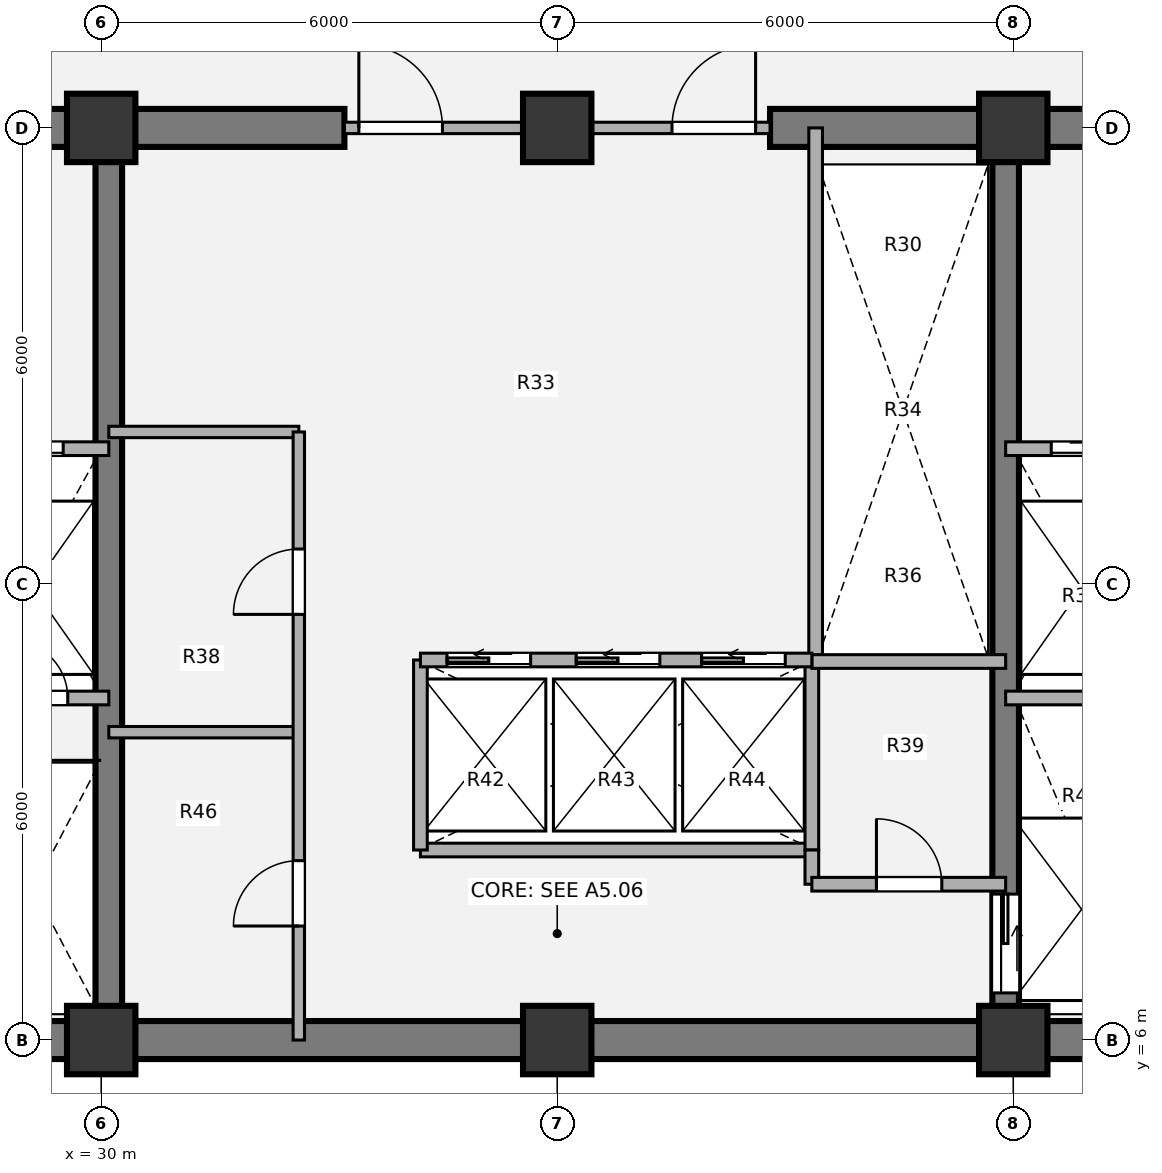
"""IFC4 building model, lengths in metres.
Left out: names, types, materials, properties, quantities, classifications, styles, units other than length and angle.
Written with IfcOpenShell. Run it as: python <this file> out.ifc"""

import sys

from ifc_helpers import new_model, si_unit, direction, frame, frame_2d, origin, origin_2d, place, context, subcontext, project, spatial, rectangle, extrude, source, transform, mapped, element, fill, save


model = new_model("IFC4")
c1 = context("Model", 3, precision=1e-05, world=origin(), true_north=direction((0.0, 1.0)))
c2 = subcontext(c1, "Body", "Model", "MODEL_VIEW")
j1 = project(units=[si_unit("LENGTHUNIT", "METRE"), si_unit("PLANEANGLEUNIT", "RADIAN")], contexts=[c1])
p1 = place(None, origin())
s1 = spatial("IfcSite", under=j1, at=p1, CompositionType="ELEMENT")
p2 = place(p1, origin())
s2 = spatial("IfcBuilding", under=s1, at=p2, CompositionType="ELEMENT")
p3 = place(p2, frame((0.0, 0.0, 131.4)))
s3 = spatial("IfcBuildingStorey", under=s2, at=p3, CompositionType="ELEMENT", Elevation=131.4)
m1 = source(origin(), c2, "Body", "SweptSolid", [
    extrude(rectangle(XDim=0.9, YDim=0.9, at=origin_2d()), origin(), (0.0, 0.0, 1.0), 3.78),
])
for number, where, z_axis, x_axis in (
    (1, (30.0, 6.0, 0.0), (0.0, 0.0, 1.0), (1.0, 0.0, 0.0)),
    (2, (36.0, 6.0, 0.0), (0.0, 0.0, 1.0), (1.0, 0.0, 0.0)),
    (3, (42.0, 6.0, 0.0), (0.0, 0.0, 1.0), (1.0, 0.0, 0.0)),
    (4, (30.0, 18.0, 0.0), (0.0, 0.0, 1.0), (1.0, 0.0, 0.0)),
    (5, (36.0, 18.0, 0.0), (0.0, 0.0, 1.0), (1.0, 0.0, 0.0)),
    (6, (42.0, 18.0, 0.0), (0.0, 0.0, 1.0), (1.0, 0.0, 0.0)),
):
    element("IfcColumn", number, at=place(p3, frame(where, z_axis=z_axis, x_axis=x_axis)), inside=s3, PredefinedType="COLUMN", context=c2, shape_type="MappedRepresentation", body=[
        mapped(m1, transform((0.0, 0.0, 0.0), x_axis=(1.0, 0.0, 0.0), y_axis=(0.0, 1.0, 0.0), z_axis=(0.0, 0.0, 1.0), scale=1.0)),
    ])
p4 = place(p3, frame((48.25, 6.0, 0.0), z_axis=(0.0, 0.0, 1.0), x_axis=(-1.0, 0.0, 0.0)))
e7 = element("IfcWall", 7, at=p4, inside=s3, PredefinedType="SHEAR", context=c2, shape_type="SweptSolid", body=[
    extrude(rectangle(XDim=24.5, YDim=0.5, at=frame_2d((12.25, 0.0))), origin(), (0.0, 0.0, 1.0), 3.78),
])
p5 = place(p3, frame((23.75, 18.0, 0.0), z_axis=(0.0, 0.0, 1.0), x_axis=(1.0, 0.0, 0.0)))
e8 = element("IfcWall", 8, at=p5, inside=s3, PredefinedType="SHEAR", context=c2, shape_type="SweptSolid", body=[
    extrude(rectangle(XDim=9.45, YDim=0.5, at=frame_2d((4.725, 0.0))), origin(), (0.0, 0.0, 1.0), 3.78),
])
p6 = place(p5, frame((2.95, 0.0, 0.0)))
e9 = element("IfcOpeningElement", 9, at=p6, cuts=e8, PredefinedType="OPENING", context=c2, shape_type="SweptSolid", body=[
    extrude(rectangle(XDim=1.1, YDim=2.1, at=origin_2d()), frame((0.55, 0.26, 1.05), z_axis=(0.0, -1.0, 0.0), x_axis=(1.0, 0.0, 0.0)), (0.0, 0.0, 1.0), 0.52),
])
p7 = place(p3, frame((38.8, 18.0, 0.0), z_axis=(0.0, 0.0, 1.0), x_axis=(1.0, 0.0, 0.0)))
e10 = element("IfcWall", 10, at=p7, inside=s3, PredefinedType="SHEAR", context=c2, shape_type="SweptSolid", body=[
    extrude(rectangle(XDim=9.45, YDim=0.5, at=frame_2d((4.725, 0.0))), origin(), (0.0, 0.0, 1.0), 3.78),
])
p8 = place(p7, frame((5.45, 0.0, 0.0)))
e11 = element("IfcOpeningElement", 11, at=p8, cuts=e10, PredefinedType="OPENING", context=c2, shape_type="SweptSolid", body=[
    extrude(rectangle(XDim=1.1, YDim=2.1, at=origin_2d()), frame((0.55, 0.26, 1.05), z_axis=(0.0, -1.0, 0.0), x_axis=(1.0, 0.0, 0.0)), (0.0, 0.0, 1.0), 0.52),
])
p9 = place(p3, frame((30.1, 6.0, 0.0), z_axis=(0.0, 0.0, 1.0), x_axis=(0.0, 1.0, 0.0)))
e12 = element("IfcWall", 12, at=p9, inside=s3, PredefinedType="SHEAR", context=c2, shape_type="SweptSolid", body=[
    extrude(rectangle(XDim=12.0, YDim=0.35, at=frame_2d((6.0, 0.0))), origin(), (0.0, 0.0, 1.0), 3.78),
])
p10 = place(p3, frame((41.9, 18.0, 0.0), z_axis=(0.0, 0.0, 1.0), x_axis=(0.0, -1.0, 0.0)))
e13 = element("IfcWall", 13, at=p10, inside=s3, PredefinedType="SHEAR", context=c2, shape_type="SweptSolid", body=[
    extrude(rectangle(XDim=12.0, YDim=0.35, at=frame_2d((6.0, 0.0))), origin(), (0.0, 0.0, 1.0), 3.78),
])
p11 = place(p10, frame((10.08, 0.0, 0.0)))
e14 = element("IfcOpeningElement", 14, at=p11, cuts=e13, PredefinedType="OPENING", context=c2, shape_type="SweptSolid", body=[
    extrude(rectangle(XDim=1.3, YDim=2.1, at=origin_2d()), frame((0.65, 0.185, 1.05), z_axis=(0.0, -1.0, 0.0), x_axis=(1.0, 0.0, 0.0)), (0.0, 0.0, 1.0), 0.37),
])
p12 = place(p3, frame((30.1, 14.0, 0.0), z_axis=(0.0, 0.0, 1.0), x_axis=(1.0, 0.0, 0.0)))
e15 = element("IfcWall", 15, at=p12, inside=s3, PredefinedType="PARTITIONING", context=c2, shape_type="SweptSolid", body=[
    extrude(rectangle(XDim=2.5, YDim=0.15, at=frame_2d((1.25, 0.0))), origin(), (0.0, 0.0, 1.0), 3.5),
])
p13 = place(p3, frame((34.2, 8.5, 0.0), z_axis=(0.0, 0.0, 1.0), x_axis=(1.0, 0.0, 0.0)))
e16 = element("IfcWall", 16, at=p13, inside=s3, PredefinedType="PARTITIONING", context=c2, shape_type="SweptSolid", body=[
    extrude(rectangle(XDim=5.15, YDim=0.18, at=frame_2d((2.575, 0.0))), origin(), (0.0, 0.0, 1.0), 3.5),
])
for number, where, z_axis, x_axis in (
    (17, (34.2, 8.5, 0.0), (0.0, 0.0, 1.0), (0.0, 1.0, 0.0)),
    (18, (39.35, 8.5, 0.0), (0.0, 0.0, 1.0), (0.0, 1.0, 0.0)),
):
    element("IfcWall", number, at=place(p3, frame(where, z_axis=z_axis, x_axis=x_axis)), inside=s3, PredefinedType="PARTITIONING", context=c2, shape_type="SweptSolid", body=[
        extrude(rectangle(XDim=2.5, YDim=0.18, at=frame_2d((1.25, 0.0))), origin(), (0.0, 0.0, 1.0), 3.5),
    ])
p14 = place(p3, frame((39.4, 11.0, 0.0), z_axis=(0.0, 0.0, 1.0), x_axis=(0.0, 1.0, 0.0)))
e19 = element("IfcWall", 19, at=p14, inside=s3, PredefinedType="PARTITIONING", context=c2, shape_type="SweptSolid", body=[
    extrude(rectangle(XDim=7.0, YDim=0.18, at=frame_2d((3.5, 0.0))), origin(), (0.0, 0.0, 1.0), 3.5),
])
p15 = place(p3, frame((30.1, 10.05, 0.0), z_axis=(0.0, 0.0, 1.0), x_axis=(1.0, 0.0, 0.0)))
e20 = element("IfcWall", 20, at=p15, inside=s3, PredefinedType="PARTITIONING", context=c2, shape_type="SweptSolid", body=[
    extrude(rectangle(XDim=2.5, YDim=0.15, at=frame_2d((1.25, 0.0))), origin(), (0.0, 0.0, 1.0), 3.5),
])
p16 = place(p3, frame((32.6, 6.0, 0.0), z_axis=(0.0, 0.0, 1.0), x_axis=(0.0, 1.0, 0.0)))
e21 = element("IfcWall", 21, at=p16, inside=s3, PredefinedType="PARTITIONING", context=c2, shape_type="SweptSolid", body=[
    extrude(rectangle(XDim=8.0, YDim=0.15, at=frame_2d((4.0, 0.0))), origin(), (0.0, 0.0, 1.0), 3.5),
])
p17 = place(p16, frame((1.5, 0.0, 0.0)))
e22 = element("IfcOpeningElement", 22, at=p17, cuts=e21, PredefinedType="OPENING", context=c2, shape_type="SweptSolid", body=[
    extrude(rectangle(XDim=0.86, YDim=2.1, at=origin_2d()), frame((0.43, 0.085, 1.05), z_axis=(0.0, -1.0, 0.0), x_axis=(1.0, 0.0, 0.0)), (0.0, 0.0, 1.0), 0.17),
])
p18 = place(p16, frame((5.6, 0.0, 0.0)))
e23 = element("IfcOpeningElement", 23, at=p18, cuts=e21, PredefinedType="OPENING", context=c2, shape_type="SweptSolid", body=[
    extrude(rectangle(XDim=0.86, YDim=2.1, at=origin_2d()), frame((0.43, 0.085, 1.05), z_axis=(0.0, -1.0, 0.0), x_axis=(1.0, 0.0, 0.0)), (0.0, 0.0, 1.0), 0.17),
])
p19 = place(p3, frame((39.35, 10.98, 0.0), z_axis=(0.0, 0.0, 1.0), x_axis=(1.0, 0.0, 0.0)))
e24 = element("IfcWall", 24, at=p19, inside=s3, PredefinedType="PARTITIONING", context=c2, shape_type="SweptSolid", body=[
    extrude(rectangle(XDim=2.55, YDim=0.18, at=frame_2d((1.275, 0.0))), origin(), (0.0, 0.0, 1.0), 3.5),
])
p20 = place(p3, frame((39.35, 8.05, 0.0), z_axis=(0.0, 0.0, 1.0), x_axis=(0.0, 1.0, 0.0)))
e25 = element("IfcWall", 25, at=p20, inside=s3, PredefinedType="PARTITIONING", context=c2, shape_type="SweptSolid", body=[
    extrude(rectangle(XDim=0.45, YDim=0.18, at=frame_2d((0.225, 0.0))), origin(), (0.0, 0.0, 1.0), 3.5),
])
p21 = place(p3, frame((39.35, 8.05, 0.0), z_axis=(0.0, 0.0, 1.0), x_axis=(1.0, 0.0, 0.0)))
e26 = element("IfcWall", 26, at=p21, inside=s3, PredefinedType="PARTITIONING", context=c2, shape_type="SweptSolid", body=[
    extrude(rectangle(XDim=2.55, YDim=0.18, at=frame_2d((1.275, 0.0))), origin(), (0.0, 0.0, 1.0), 3.5),
])
p22 = place(p21, frame((0.85, 0.0, 0.0)))
e27 = element("IfcOpeningElement", 27, at=p22, cuts=e26, PredefinedType="OPENING", context=c2, shape_type="SweptSolid", body=[
    extrude(rectangle(XDim=0.86, YDim=2.1, at=origin_2d()), frame((0.43, 0.1, 1.05), z_axis=(0.0, -1.0, 0.0), x_axis=(1.0, 0.0, 0.0)), (0.0, 0.0, 1.0), 0.2),
])
p23 = place(p3, frame((33.2, 18.0, 0.0), z_axis=(0.0, 0.0, 1.0), x_axis=(1.0, 0.0, 0.0)))
e28 = element("IfcWall", 28, at=p23, inside=s3, PredefinedType="PARTITIONING", context=c2, shape_type="SweptSolid", body=[
    extrude(rectangle(XDim=5.6, YDim=0.15, at=frame_2d((2.8, 0.0))), origin(), (0.0, 0.0, 1.0), 2.315),
])
p24 = place(p23, frame((0.19, 0.0, 0.0)))
e29 = element("IfcOpeningElement", 29, at=p24, cuts=e28, PredefinedType="OPENING", context=c2, shape_type="SweptSolid", body=[
    extrude(rectangle(XDim=1.1, YDim=2.1, at=origin_2d()), frame((0.55, 0.085, 1.05), z_axis=(0.0, -1.0, 0.0), x_axis=(1.0, 0.0, 0.0)), (0.0, 0.0, 1.0), 0.17),
])
p25 = place(p23, frame((4.31, 0.0, 0.0)))
e30 = element("IfcOpeningElement", 30, at=p25, cuts=e28, PredefinedType="OPENING", context=c2, shape_type="SweptSolid", body=[
    extrude(rectangle(XDim=1.1, YDim=2.1, at=origin_2d()), frame((0.55, 0.085, 1.05), z_axis=(0.0, -1.0, 0.0), x_axis=(1.0, 0.0, 0.0)), (0.0, 0.0, 1.0), 0.17),
])
p26 = place(p3, frame((24.0, 13.78, 0.0), z_axis=(0.0, 0.0, 1.0), x_axis=(1.0, 0.0, 0.0)))
e31 = element("IfcWall", 31, at=p26, inside=s3, PredefinedType="PARTITIONING", context=c2, shape_type="SweptSolid", body=[
    extrude(rectangle(XDim=6.1, YDim=0.18, at=frame_2d((3.05, 0.0))), origin(), (0.0, 0.0, 1.0), 3.5),
])
p27 = place(p26, frame((1.15, 0.0, 0.0)))
e32 = element("IfcOpeningElement", 32, at=p27, cuts=e31, PredefinedType="OPENING", context=c2, shape_type="SweptSolid", body=[
    extrude(rectangle(XDim=1.1, YDim=2.1, at=origin_2d()), frame((0.55, 0.1, 1.05), z_axis=(0.0, -1.0, 0.0), x_axis=(1.0, 0.0, 0.0)), (0.0, 0.0, 1.0), 0.2),
])
p28 = place(p26, frame((4.4, 0.0, 0.0)))
e33 = element("IfcOpeningElement", 33, at=p28, cuts=e31, PredefinedType="OPENING", context=c2, shape_type="SweptSolid", body=[
    extrude(rectangle(XDim=1.1, YDim=2.1, at=origin_2d()), frame((0.55, 0.1, 1.05), z_axis=(0.0, -1.0, 0.0), x_axis=(1.0, 0.0, 0.0)), (0.0, 0.0, 1.0), 0.2),
])
p29 = place(p3, frame((28.15, 10.5, 0.0), z_axis=(0.0, 0.0, 1.0), x_axis=(1.0, 0.0, 0.0)))
e34 = element("IfcWall", 34, at=p29, inside=s3, PredefinedType="PARTITIONING", context=c2, shape_type="SweptSolid", body=[
    extrude(rectangle(XDim=1.95, YDim=0.18, at=frame_2d((0.975, 0.0))), origin(), (0.0, 0.0, 1.0), 3.5),
])
p30 = place(p29, frame((0.65, 0.0, 0.0)))
e35 = element("IfcOpeningElement", 35, at=p30, cuts=e34, PredefinedType="OPENING", context=c2, shape_type="SweptSolid", body=[
    extrude(rectangle(XDim=0.76, YDim=2.05, at=origin_2d()), frame((0.38, 0.1, 1.025), z_axis=(0.0, -1.0, 0.0), x_axis=(1.0, 0.0, 0.0)), (0.0, 0.0, 1.0), 0.2),
])
p31 = place(p3, frame((41.9, 13.78, 0.0), z_axis=(0.0, 0.0, 1.0), x_axis=(1.0, 0.0, 0.0)))
e36 = element("IfcWall", 36, at=p31, inside=s3, PredefinedType="PARTITIONING", context=c2, shape_type="SweptSolid", body=[
    extrude(rectangle(XDim=6.1, YDim=0.18, at=frame_2d((3.05, 0.0))), origin(), (0.0, 0.0, 1.0), 3.5),
])
p32 = place(p31, frame((0.6, 0.0, 0.0)))
e37 = element("IfcOpeningElement", 37, at=p32, cuts=e36, PredefinedType="OPENING", context=c2, shape_type="SweptSolid", body=[
    extrude(rectangle(XDim=1.1, YDim=2.1, at=origin_2d()), frame((0.55, 0.1, 1.05), z_axis=(0.0, -1.0, 0.0), x_axis=(1.0, 0.0, 0.0)), (0.0, 0.0, 1.0), 0.2),
])
p33 = place(p31, frame((3.8, 0.0, 0.0)))
e38 = element("IfcOpeningElement", 38, at=p33, cuts=e36, PredefinedType="OPENING", context=c2, shape_type="SweptSolid", body=[
    extrude(rectangle(XDim=1.1, YDim=2.1, at=origin_2d()), frame((0.55, 0.1, 1.05), z_axis=(0.0, -1.0, 0.0), x_axis=(1.0, 0.0, 0.0)), (0.0, 0.0, 1.0), 0.2),
])
p34 = place(p3, frame((41.9, 10.5, 0.0), z_axis=(0.0, 0.0, 1.0), x_axis=(1.0, 0.0, 0.0)))
e39 = element("IfcWall", 39, at=p34, inside=s3, PredefinedType="PARTITIONING", context=c2, shape_type="SweptSolid", body=[
    extrude(rectangle(XDim=1.95, YDim=0.18, at=frame_2d((0.975, 0.0))), origin(), (0.0, 0.0, 1.0), 3.5),
])
p35 = place(p3, frame((34.2, 11.0, 0.0), z_axis=(0.0, 0.0, 1.0), x_axis=(1.0, 0.0, 0.0)))
e40 = element("IfcWall", 40, at=p35, inside=s3, PredefinedType="PARTITIONING", context=c2, shape_type="SweptSolid", body=[
    extrude(rectangle(XDim=5.15, YDim=0.18, at=frame_2d((2.575, 0.0))), origin(), (0.0, 0.0, 1.0), 3.5),
])
p36 = place(p35, frame((0.35, 0.0, 0.0)))
e41 = element("IfcOpeningElement", 41, at=p36, cuts=e40, PredefinedType="OPENING", context=c2, shape_type="SweptSolid", body=[
    extrude(rectangle(XDim=1.1, YDim=2.1, at=origin_2d()), frame((0.55, 0.1, 1.05), z_axis=(0.0, -1.0, 0.0), x_axis=(1.0, 0.0, 0.0)), (0.0, 0.0, 1.0), 0.2),
])
p37 = place(p35, frame((2.05, 0.0, 0.0)))
e42 = element("IfcOpeningElement", 42, at=p37, cuts=e40, PredefinedType="OPENING", context=c2, shape_type="SweptSolid", body=[
    extrude(rectangle(XDim=1.1, YDim=2.1, at=origin_2d()), frame((0.55, 0.1, 1.05), z_axis=(0.0, -1.0, 0.0), x_axis=(1.0, 0.0, 0.0)), (0.0, 0.0, 1.0), 0.2),
])
p38 = place(p35, frame((3.7, 0.0, 0.0)))
e43 = element("IfcOpeningElement", 43, at=p38, cuts=e40, PredefinedType="OPENING", context=c2, shape_type="SweptSolid", body=[
    extrude(rectangle(XDim=1.1, YDim=2.1, at=origin_2d()), frame((0.55, 0.1, 1.05), z_axis=(0.0, -1.0, 0.0), x_axis=(1.0, 0.0, 0.0)), (0.0, 0.0, 1.0), 0.2),
])
m2 = source(origin(), c2, "Body", "SweptSolid", [
    extrude(rectangle(XDim=0.86, YDim=2.1, at=origin_2d()), frame((0.43, 0.025, 1.05), z_axis=(0.0, -1.0, 0.0), x_axis=(1.0, 0.0, 0.0)), (0.0, 0.0, 1.0), 0.05),
])
p39 = place(p17, origin())
e44 = element("IfcDoor", 44, at=p39, inside=s3, OperationType="SINGLE_SWING_LEFT", PredefinedType="DOOR", context=c2, shape_type="MappedRepresentation", body=[
    mapped(m2, transform((0.0, 0.0, 0.0), x_axis=(1.0, 0.0, 0.0), y_axis=(0.0, 1.0, 0.0), z_axis=(0.0, 0.0, 1.0), scale=1.0)),
])
fill(e22, e44)
p40 = place(p18, origin())
e45 = element("IfcDoor", 45, at=p40, inside=s3, OperationType="SINGLE_SWING_LEFT", PredefinedType="DOOR", context=c2, shape_type="MappedRepresentation", body=[
    mapped(m2, transform((0.0, 0.0, 0.0), x_axis=(1.0, 0.0, 0.0), y_axis=(0.0, 1.0, 0.0), z_axis=(0.0, 0.0, 1.0), scale=1.0)),
])
fill(e23, e45)
p41 = place(p22, origin())
e46 = element("IfcDoor", 46, at=p41, inside=s3, OperationType="SINGLE_SWING_LEFT", PredefinedType="DOOR", context=c2, shape_type="MappedRepresentation", body=[
    mapped(m2, transform((0.0, 0.0, 0.0), x_axis=(1.0, 0.0, 0.0), y_axis=(0.0, 1.0, 0.0), z_axis=(0.0, 0.0, 1.0), scale=1.0)),
])
fill(e27, e46)
m3 = source(origin(), c2, "Body", "SweptSolid", [
    extrude(rectangle(XDim=1.1, YDim=2.1, at=origin_2d()), frame((0.55, 0.025, 1.05), z_axis=(0.0, -1.0, 0.0), x_axis=(1.0, 0.0, 0.0)), (0.0, 0.0, 1.0), 0.05),
])
p42 = place(p24, origin())
e47 = element("IfcDoor", 47, at=p42, inside=s3, OperationType="SINGLE_SWING_LEFT", PredefinedType="DOOR", context=c2, shape_type="MappedRepresentation", body=[
    mapped(m3, transform((0.0, 0.0, 0.0), x_axis=(1.0, 0.0, 0.0), y_axis=(0.0, 1.0, 0.0), z_axis=(0.0, 0.0, 1.0), scale=1.0)),
])
fill(e29, e47)
p43 = place(p25, origin())
e48 = element("IfcDoor", 48, at=p43, inside=s3, OperationType="SINGLE_SWING_RIGHT", PredefinedType="DOOR", context=c2, shape_type="MappedRepresentation", body=[
    mapped(m3, transform((0.0, 0.0, 0.0), x_axis=(1.0, 0.0, 0.0), y_axis=(0.0, 1.0, 0.0), z_axis=(0.0, 0.0, 1.0), scale=1.0)),
])
fill(e30, e48)
m4 = source(origin(), c2, "Body", "SweptSolid", [
    extrude(rectangle(XDim=1.1, YDim=2.1, at=origin_2d()), frame((0.55, 0.025, 1.05), z_axis=(0.0, -1.0, 0.0), x_axis=(1.0, 0.0, 0.0)), (0.0, 0.0, 1.0), 0.05),
])
p44 = place(p28, origin())
e49 = element("IfcDoor", 49, at=p44, inside=s3, OperationType="SLIDING_TO_LEFT", PredefinedType="DOOR", context=c2, shape_type="MappedRepresentation", body=[
    mapped(m4, transform((0.0, 0.0, 0.0), x_axis=(1.0, 0.0, 0.0), y_axis=(0.0, 1.0, 0.0), z_axis=(0.0, 0.0, 1.0), scale=1.0)),
])
fill(e33, e49)
m5 = source(origin(), c2, "Body", "SweptSolid", [
    extrude(rectangle(XDim=0.76, YDim=2.05, at=origin_2d()), frame((0.38, 0.025, 1.025), z_axis=(0.0, -1.0, 0.0), x_axis=(1.0, 0.0, 0.0)), (0.0, 0.0, 1.0), 0.05),
])
p45 = place(p30, origin())
e50 = element("IfcDoor", 50, at=p45, inside=s3, OperationType="SINGLE_SWING_LEFT", PredefinedType="DOOR", context=c2, shape_type="MappedRepresentation", body=[
    mapped(m5, transform((0.0, 0.0, 0.0), x_axis=(1.0, 0.0, 0.0), y_axis=(0.0, 1.0, 0.0), z_axis=(0.0, 0.0, 1.0), scale=1.0)),
])
fill(e35, e50)
p46 = place(p32, origin())
e51 = element("IfcDoor", 51, at=p46, inside=s3, OperationType="SLIDING_TO_RIGHT", PredefinedType="DOOR", context=c2, shape_type="MappedRepresentation", body=[
    mapped(m4, transform((0.0, 0.0, 0.0), x_axis=(1.0, 0.0, 0.0), y_axis=(0.0, 1.0, 0.0), z_axis=(0.0, 0.0, 1.0), scale=1.0)),
])
fill(e37, e51)
m6 = source(origin(), c2, "Body", "SweptSolid", [
    extrude(rectangle(XDim=1.3, YDim=2.1, at=origin_2d()), frame((0.65, 0.025, 1.05), z_axis=(0.0, -1.0, 0.0), x_axis=(1.0, 0.0, 0.0)), (0.0, 0.0, 1.0), 0.05),
])
p47 = place(p11, origin())
e52 = element("IfcDoor", 52, at=p47, inside=s3, OperationType="SLIDING_TO_LEFT", PredefinedType="DOOR", context=c2, shape_type="MappedRepresentation", body=[
    mapped(m6, transform((0.0, 0.0, 0.0), x_axis=(1.0, 0.0, 0.0), y_axis=(0.0, 1.0, 0.0), z_axis=(0.0, 0.0, 1.0), scale=1.0)),
])
fill(e14, e52)
p48 = place(p36, origin())
e53 = element("IfcDoor", 53, at=p48, inside=s3, OperationType="SLIDING_TO_LEFT", PredefinedType="DOOR", context=c2, shape_type="MappedRepresentation", body=[
    mapped(m4, transform((0.0, 0.0, 0.0), x_axis=(1.0, 0.0, 0.0), y_axis=(0.0, 1.0, 0.0), z_axis=(0.0, 0.0, 1.0), scale=1.0)),
])
fill(e41, e53)
p49 = place(p37, origin())
e54 = element("IfcDoor", 54, at=p49, inside=s3, OperationType="SLIDING_TO_LEFT", PredefinedType="DOOR", context=c2, shape_type="MappedRepresentation", body=[
    mapped(m4, transform((0.0, 0.0, 0.0), x_axis=(1.0, 0.0, 0.0), y_axis=(0.0, 1.0, 0.0), z_axis=(0.0, 0.0, 1.0), scale=1.0)),
])
fill(e42, e54)
p50 = place(p38, origin())
e55 = element("IfcDoor", 55, at=p50, inside=s3, OperationType="SLIDING_TO_LEFT", PredefinedType="DOOR", context=c2, shape_type="MappedRepresentation", body=[
    mapped(m4, transform((0.0, 0.0, 0.0), x_axis=(1.0, 0.0, 0.0), y_axis=(0.0, 1.0, 0.0), z_axis=(0.0, 0.0, 1.0), scale=1.0)),
])
fill(e43, e55)
save(model, sys.argv[1])
